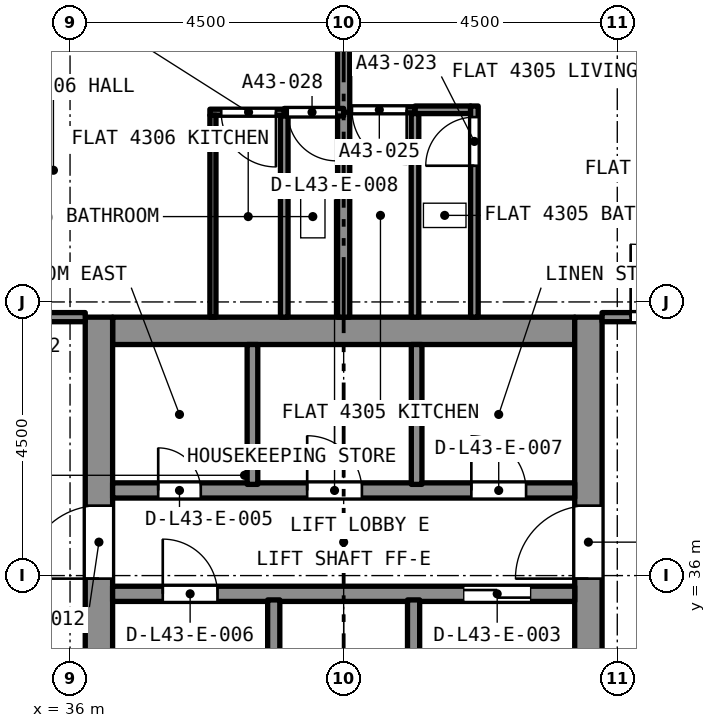
"""IFC4 building model, lengths in metres.
Left out: names, types, materials, properties, quantities, classifications, styles, units other than length and angle.
Written with IfcOpenShell. Run it as: python <this file> out.ifc"""

import sys

from ifc_helpers import new_model, si_unit, direction, frame, frame_2d, origin, place, context, subcontext, project, spatial, rectangle, extrude, element, fill, save


model = new_model("IFC4")
c1 = context("Model", 3, precision=1e-05, world=origin(), true_north=direction((0.0, 1.0)))
c2 = subcontext(c1, "Body", "Model", "MODEL_VIEW")
j1 = project(units=[si_unit("LENGTHUNIT", "METRE"), si_unit("PLANEANGLEUNIT", "RADIAN")], contexts=[c1])
p1 = place(None, origin())
s1 = spatial("IfcSite", under=j1, at=p1, CompositionType="ELEMENT")
p2 = place(p1, origin())
s2 = spatial("IfcBuilding", under=s1, at=p2, CompositionType="ELEMENT")
p3 = place(p2, frame((0.0, 0.0, 155.0)))
s3 = spatial("IfcBuildingStorey", under=s2, at=p3, CompositionType="ELEMENT", Elevation=155.0)
p4 = place(p3, frame((36.7, 40.025, 0.0), z_axis=(0.0, 0.0, 1.0), x_axis=(1.0, 0.0, 0.0)))
e1 = element("IfcWall", 1, at=p4, inside=s3, PredefinedType="SOLIDWALL", context=c2, shape_type="SweptSolid", body=[
    extrude(rectangle(XDim=7.6, YDim=0.45, at=frame_2d((3.8, 0.0))), origin(), (0.0, 0.0, 1.0), 4.4),
])
p5 = place(p3, frame((36.475, 27.25, 0.0), z_axis=(0.0, 0.0, 1.0), x_axis=(0.0, 1.0, 0.0)))
e2 = element("IfcWall", 2, at=p5, inside=s3, PredefinedType="SOLIDWALL", context=c2, shape_type="SweptSolid", body=[
    extrude(rectangle(XDim=13.0, YDim=0.45, at=frame_2d((6.5, 0.0))), origin(), (0.0, 0.0, 1.0), 4.4),
])
p6 = place(p5, frame((8.7, 0.0, 0.0)))
e3 = element("IfcOpeningElement", 3, at=p6, cuts=e2, PredefinedType="OPENING", context=c2, shape_type="SweptSolid", body=[
    extrude(rectangle(XDim=1.2, YDim=2.1, at=frame_2d((0.6, 1.05))), frame((0.0, 0.235, 0.0), z_axis=(0.0, -1.0, 0.0), x_axis=(1.0, 0.0, 0.0)), (0.0, 0.0, 1.0), 0.47),
])
p7 = place(p3, frame((44.525, 27.25, 0.0), z_axis=(0.0, 0.0, 1.0), x_axis=(0.0, 1.0, 0.0)))
e4 = element("IfcWall", 4, at=p7, inside=s3, PredefinedType="SOLIDWALL", context=c2, shape_type="SweptSolid", body=[
    extrude(rectangle(XDim=13.0, YDim=0.45, at=frame_2d((6.5, 0.0))), origin(), (0.0, 0.0, 1.0), 4.4),
])
p8 = place(p7, frame((8.7, 0.0, 0.0)))
e5 = element("IfcOpeningElement", 5, at=p8, cuts=e4, PredefinedType="OPENING", context=c2, shape_type="SweptSolid", body=[
    extrude(rectangle(XDim=1.2, YDim=2.1, at=frame_2d((0.6, 1.05))), frame((0.0, 0.235, 0.0), z_axis=(0.0, -1.0, 0.0), x_axis=(1.0, 0.0, 0.0)), (0.0, 0.0, 1.0), 0.47),
])
p9 = place(p3, frame((41.673, 43.66, 0.0), z_axis=(0.0, 0.0, 1.0), x_axis=(1.0, 0.0, 0.0)))
e6 = element("IfcWall", 6, at=p9, inside=s3, PredefinedType="PARTITIONING", context=c2, shape_type="SweptSolid", body=[
    extrude(rectangle(XDim=0.915, YDim=0.125, at=frame_2d((0.458, 0.0))), origin(), (0.0, 0.0, 1.0), 4.1),
])
p10 = place(p3, frame((42.65, 40.25, 0.0), z_axis=(0.0, 0.0, 1.0), x_axis=(0.0, 1.0, 0.0)))
e7 = element("IfcWall", 7, at=p10, inside=s3, PredefinedType="PARTITIONING", context=c2, shape_type="SweptSolid", body=[
    extrude(rectangle(XDim=3.472, YDim=0.125, at=frame_2d((1.736, 0.0))), origin(), (0.0, 0.0, 1.0), 4.1),
])
p11 = place(p10, frame((2.49, 0.0, 0.0)))
e8 = element("IfcOpeningElement", 8, at=p11, cuts=e7, PredefinedType="OPENING", context=c2, shape_type="SweptSolid", body=[
    extrude(rectangle(XDim=0.8, YDim=2.1, at=frame_2d((0.4, 1.05))), frame((0.0, 0.073, 0.0), z_axis=(0.0, -1.0, 0.0), x_axis=(1.0, 0.0, 0.0)), (0.0, 0.0, 1.0), 0.145),
])
p12 = place(p3, frame((41.673, 40.25, 0.0), z_axis=(0.0, 0.0, 1.0), x_axis=(0.0, 1.0, 0.0)))
e9 = element("IfcWall", 9, at=p12, inside=s3, PredefinedType="PARTITIONING", context=c2, shape_type="SweptSolid", body=[
    extrude(rectangle(XDim=3.347, YDim=0.125, at=frame_2d((1.674, 0.0))), origin(), (0.0, 0.0, 1.0), 4.1),
])
p13 = place(p3, frame((41.673, 43.66, 0.0), z_axis=(0.0, 0.0, 1.0), x_axis=(-1.0, 0.0, 0.0)))
e10 = element("IfcWall", 10, at=p13, inside=s3, PredefinedType="PARTITIONING", context=c2, shape_type="SweptSolid", body=[
    extrude(rectangle(XDim=1.073, YDim=0.1, at=frame_2d((0.536, 0.0))), origin(), (0.0, 0.0, 1.0), 4.1),
])
p14 = place(p13, frame((0.136, 0.0, 0.0)))
e11 = element("IfcOpeningElement", 11, at=p14, cuts=e10, PredefinedType="OPENING", context=c2, shape_type="SweptSolid", body=[
    extrude(rectangle(XDim=0.9, YDim=2.1, at=frame_2d((0.45, 1.05))), frame((0.0, 0.06, 0.0), z_axis=(0.0, -1.0, 0.0), x_axis=(1.0, 0.0, 0.0)), (0.0, 0.0, 1.0), 0.12),
])
p15 = place(p3, frame((40.5, 43.61, 0.0), z_axis=(0.0, 0.0, 1.0), x_axis=(0.0, 1.0, 0.0)))
e12 = element("IfcWall", 12, at=p15, inside=s3, PredefinedType="PARTITIONING", context=c2, shape_type="SweptSolid", body=[
    extrude(rectangle(XDim=5.415, YDim=0.2, at=frame_2d((2.708, 0.0))), origin(), (0.0, 0.0, 1.0), 4.1),
])
p16 = place(p3, frame((44.75, 40.25, 0.0), z_axis=(0.0, 0.0, 1.0), x_axis=(1.0, 0.0, 0.0)))
e13 = element("IfcWall", 13, at=p16, inside=s3, PredefinedType="PARTITIONING", context=c2, shape_type="SweptSolid", body=[
    extrude(rectangle(XDim=1.8, YDim=0.15, at=frame_2d((0.9, 0.0))), origin(), (0.0, 0.0, 1.0), 4.1),
])
p17 = place(p16, frame((0.47, 0.0, 0.0)))
e14 = element("IfcOpeningElement", 14, at=p17, cuts=e13, PredefinedType="OPENING", context=c2, shape_type="SweptSolid", body=[
    extrude(rectangle(XDim=1.2, YDim=2.4, at=frame_2d((0.6, 1.2))), frame((0.0, 0.085, 0.0), z_axis=(0.0, -1.0, 0.0), x_axis=(1.0, 0.0, 0.0)), (0.0, 0.0, 1.0), 0.17),
])
p18 = place(p3, frame((40.5, 40.25, 0.0), z_axis=(0.0, 0.0, 1.0), x_axis=(0.0, 1.0, 0.0)))
e15 = element("IfcWall", 15, at=p18, inside=s3, PredefinedType="PARTITIONING", context=c2, shape_type="SweptSolid", body=[
    extrude(rectangle(XDim=3.37, YDim=0.2, at=frame_2d((1.685, 0.0))), origin(), (0.0, 0.0, 1.0), 4.1),
])
p19 = place(p3, frame((40.5, 43.62, 0.0), z_axis=(0.0, 0.0, 1.0), x_axis=(-1.0, 0.0, 0.0)))
e16 = element("IfcWall", 16, at=p19, inside=s3, PredefinedType="PARTITIONING", context=c2, shape_type="SweptSolid", body=[
    extrude(rectangle(XDim=0.977, YDim=0.125, at=frame_2d((0.489, 0.0))), origin(), (0.0, 0.0, 1.0), 4.1),
])
p20 = place(p19, frame((0.12, 0.0, 0.0)))
e17 = element("IfcOpeningElement", 17, at=p20, cuts=e16, PredefinedType="OPENING", context=c2, shape_type="SweptSolid", body=[
    extrude(rectangle(XDim=0.8, YDim=2.1, at=frame_2d((0.4, 1.05))), frame((0.0, 0.073, 0.0), z_axis=(0.0, -1.0, 0.0), x_axis=(1.0, 0.0, 0.0)), (0.0, 0.0, 1.0), 0.145),
])
p21 = place(p3, frame((39.523, 40.25, 0.0), z_axis=(0.0, 0.0, 1.0), x_axis=(0.0, 1.0, 0.0)))
e18 = element("IfcWall", 18, at=p21, inside=s3, PredefinedType="PARTITIONING", context=c2, shape_type="SweptSolid", body=[
    extrude(rectangle(XDim=3.308, YDim=0.125, at=frame_2d((1.654, 0.0))), origin(), (0.0, 0.0, 1.0), 4.1),
])
p22 = place(p3, frame((39.523, 43.62, 0.0), z_axis=(0.0, 0.0, 1.0), x_axis=(-1.0, 0.0, 0.0)))
e19 = element("IfcWall", 19, at=p22, inside=s3, PredefinedType="PARTITIONING", context=c2, shape_type="SweptSolid", body=[
    extrude(rectangle(XDim=1.223, YDim=0.1, at=frame_2d((0.611, 0.0))), origin(), (0.0, 0.0, 1.0), 4.1),
])
p23 = place(p22, frame((0.136, 0.0, 0.0)))
e20 = element("IfcOpeningElement", 20, at=p23, cuts=e19, PredefinedType="OPENING", context=c2, shape_type="SweptSolid", body=[
    extrude(rectangle(XDim=0.9, YDim=2.1, at=frame_2d((0.45, 1.05))), frame((0.0, 0.06, 0.0), z_axis=(0.0, -1.0, 0.0), x_axis=(1.0, 0.0, 0.0)), (0.0, 0.0, 1.0), 0.12),
])
p24 = place(p3, frame((38.35, 40.25, 0.0), z_axis=(0.0, 0.0, 1.0), x_axis=(0.0, 1.0, 0.0)))
e21 = element("IfcWall", 21, at=p24, inside=s3, PredefinedType="PARTITIONING", context=c2, shape_type="SweptSolid", body=[
    extrude(rectangle(XDim=3.32, YDim=0.1, at=frame_2d((1.66, 0.0))), origin(), (0.0, 0.0, 1.0), 4.1),
])
p25 = place(p3, frame((33.975, 40.25, 0.0), z_axis=(0.0, 0.0, 1.0), x_axis=(1.0, 0.0, 0.0)))
e22 = element("IfcWall", 22, at=p25, inside=s3, PredefinedType="PARTITIONING", context=c2, shape_type="SweptSolid", body=[
    extrude(rectangle(XDim=2.275, YDim=0.15, at=frame_2d((1.137, 0.0))), origin(), (0.0, 0.0, 1.0), 4.1),
])
p26 = place(p25, frame((0.13, 0.0, 0.0)))
e23 = element("IfcOpeningElement", 23, at=p26, cuts=e22, PredefinedType="OPENING", context=c2, shape_type="SweptSolid", body=[
    extrude(rectangle(XDim=1.2, YDim=2.4, at=frame_2d((0.6, 1.2))), frame((0.0, 0.085, 0.0), z_axis=(0.0, -1.0, 0.0), x_axis=(1.0, 0.0, 0.0)), (0.0, 0.0, 1.0), 0.17),
])
p27 = place(p3, frame((36.7, 35.7, 0.0), z_axis=(0.0, 0.0, 1.0), x_axis=(1.0, 0.0, 0.0)))
e24 = element("IfcWall", 24, at=p27, inside=s3, PredefinedType="SOLIDWALL", context=c2, shape_type="SweptSolid", body=[
    extrude(rectangle(XDim=7.6, YDim=0.25, at=frame_2d((3.8, 0.0))), origin(), (0.0, 0.0, 1.0), 4.1),
])
p28 = place(p27, frame((5.775, 0.0, 0.0)))
e25 = element("IfcOpeningElement", 25, at=p28, cuts=e24, PredefinedType="OPENING", context=c2, shape_type="SweptSolid", body=[
    extrude(rectangle(XDim=1.1, YDim=2.4, at=frame_2d((0.55, 1.2))), frame((0.0, 0.135, 0.0), z_axis=(0.0, -1.0, 0.0), x_axis=(1.0, 0.0, 0.0)), (0.0, 0.0, 1.0), 0.27),
])
p29 = place(p27, frame((0.825, 0.0, 0.0)))
e26 = element("IfcOpeningElement", 26, at=p29, cuts=e24, PredefinedType="OPENING", context=c2, shape_type="SweptSolid", body=[
    extrude(rectangle(XDim=0.9, YDim=2.1, at=frame_2d((0.45, 1.05))), frame((0.0, 0.135, 0.0), z_axis=(0.0, -1.0, 0.0), x_axis=(1.0, 0.0, 0.0)), (0.0, 0.0, 1.0), 0.27),
])
p30 = place(p3, frame((36.7, 37.4, 0.0), z_axis=(0.0, 0.0, 1.0), x_axis=(1.0, 0.0, 0.0)))
e27 = element("IfcWall", 27, at=p30, inside=s3, PredefinedType="SOLIDWALL", context=c2, shape_type="SweptSolid", body=[
    extrude(rectangle(XDim=7.6, YDim=0.25, at=frame_2d((3.8, 0.0))), origin(), (0.0, 0.0, 1.0), 4.1),
])
p31 = place(p30, frame((0.75, 0.0, 0.0)))
e28 = element("IfcOpeningElement", 28, at=p31, cuts=e27, PredefinedType="OPENING", context=c2, shape_type="SweptSolid", body=[
    extrude(rectangle(XDim=0.7, YDim=2.1, at=frame_2d((0.35, 1.05))), frame((0.0, 0.135, 0.0), z_axis=(0.0, -1.0, 0.0), x_axis=(1.0, 0.0, 0.0)), (0.0, 0.0, 1.0), 0.27),
])
p32 = place(p30, frame((5.9, 0.0, 0.0)))
e29 = element("IfcOpeningElement", 29, at=p32, cuts=e27, PredefinedType="OPENING", context=c2, shape_type="SweptSolid", body=[
    extrude(rectangle(XDim=0.9, YDim=2.1, at=frame_2d((0.45, 1.05))), frame((0.0, 0.135, 0.0), z_axis=(0.0, -1.0, 0.0), x_axis=(1.0, 0.0, 0.0)), (0.0, 0.0, 1.0), 0.27),
])
p33 = place(p30, frame((3.2, 0.0, 0.0)))
e30 = element("IfcOpeningElement", 30, at=p33, cuts=e27, PredefinedType="OPENING", context=c2, shape_type="SweptSolid", body=[
    extrude(rectangle(XDim=0.9, YDim=2.1, at=frame_2d((0.45, 1.05))), frame((0.0, 0.135, 0.0), z_axis=(0.0, -1.0, 0.0), x_axis=(1.0, 0.0, 0.0)), (0.0, 0.0, 1.0), 0.27),
])
for number, where, z_axis, x_axis in (
    (31, (41.65, 33.3, 0.0), (0.0, 0.0, 1.0), (0.0, 1.0, 0.0)),
    (32, (39.35, 33.3, 0.0), (0.0, 0.0, 1.0), (0.0, 1.0, 0.0)),
):
    element("IfcWall", number, at=place(p3, frame(where, z_axis=z_axis, x_axis=x_axis)), inside=s3, PredefinedType="SOLIDWALL", context=c2, shape_type="SweptSolid", body=[
        extrude(rectangle(XDim=2.3, YDim=0.2, at=frame_2d((1.15, 0.0))), origin(), (0.0, 0.0, 1.0), 4.1),
    ])
for number, where, z_axis, x_axis in (
    (33, (41.7, 37.5, 0.0), (0.0, 0.0, 1.0), (0.0, 1.0, 0.0)),
    (34, (39.0, 37.5, 0.0), (0.0, 0.0, 1.0), (0.0, 1.0, 0.0)),
):
    element("IfcWall", number, at=place(p3, frame(where, z_axis=z_axis, x_axis=x_axis)), inside=s3, PredefinedType="SOLIDWALL", context=c2, shape_type="SweptSolid", body=[
        extrude(rectangle(XDim=2.3, YDim=0.175, at=frame_2d((1.15, 0.0))), origin(), (0.0, 0.0, 1.0), 4.1),
    ])
p34 = place(p11, origin())
e35 = element("IfcDoor", 35, at=p34, inside=s3, OperationType="SINGLE_SWING_RIGHT", PredefinedType="DOOR", context=c2, shape_type="SweptSolid", body=[
    extrude(rectangle(XDim=0.8, YDim=2.1, at=frame_2d((0.4, 1.05))), frame((0.0, 0.025, 0.0), z_axis=(0.0, -1.0, 0.0), x_axis=(1.0, 0.0, 0.0)), (0.0, 0.0, 1.0), 0.05),
])
fill(e8, e35)
p35 = place(p14, origin())
e36 = element("IfcDoor", 36, at=p35, inside=s3, OperationType="SINGLE_SWING_RIGHT", PredefinedType="DOOR", context=c2, shape_type="SweptSolid", body=[
    extrude(rectangle(XDim=0.9, YDim=2.1, at=frame_2d((0.45, 1.05))), frame((0.0, 0.025, 0.0), z_axis=(0.0, -1.0, 0.0), x_axis=(1.0, 0.0, 0.0)), (0.0, 0.0, 1.0), 0.05),
])
fill(e11, e36)
p36 = place(p17, origin())
e37 = element("IfcDoor", 37, at=p36, inside=s3, OperationType="SINGLE_SWING_RIGHT", PredefinedType="DOOR", context=c2, shape_type="SweptSolid", body=[
    extrude(rectangle(XDim=1.2, YDim=2.4, at=frame_2d((0.6, 1.2))), frame((0.0, 0.025, 0.0), z_axis=(0.0, -1.0, 0.0), x_axis=(1.0, 0.0, 0.0)), (0.0, 0.0, 1.0), 0.05),
])
fill(e14, e37)
p37 = place(p20, origin())
e38 = element("IfcDoor", 38, at=p37, inside=s3, OperationType="SINGLE_SWING_LEFT", PredefinedType="DOOR", context=c2, shape_type="SweptSolid", body=[
    extrude(rectangle(XDim=0.8, YDim=2.1, at=frame_2d((0.4, 1.05))), frame((0.0, 0.025, 0.0), z_axis=(0.0, -1.0, 0.0), x_axis=(1.0, 0.0, 0.0)), (0.0, 0.0, 1.0), 0.05),
])
fill(e17, e38)
p38 = place(p23, origin())
e39 = element("IfcDoor", 39, at=p38, inside=s3, OperationType="SINGLE_SWING_LEFT", PredefinedType="DOOR", context=c2, shape_type="SweptSolid", body=[
    extrude(rectangle(XDim=0.9, YDim=2.1, at=frame_2d((0.45, 1.05))), frame((0.0, 0.025, 0.0), z_axis=(0.0, -1.0, 0.0), x_axis=(1.0, 0.0, 0.0)), (0.0, 0.0, 1.0), 0.05),
])
fill(e20, e39)
p39 = place(p28, origin())
e40 = element("IfcDoor", 40, at=p39, inside=s3, OperationType="SLIDING_TO_LEFT", PredefinedType="DOOR", context=c2, shape_type="SweptSolid", body=[
    extrude(rectangle(XDim=1.1, YDim=2.4, at=frame_2d((0.55, 1.2))), frame((0.0, 0.025, 0.0), z_axis=(0.0, -1.0, 0.0), x_axis=(1.0, 0.0, 0.0)), (0.0, 0.0, 1.0), 0.05),
])
fill(e25, e40)
p40 = place(p31, origin())
e41 = element("IfcDoor", 41, at=p40, inside=s3, OperationType="SINGLE_SWING_LEFT", PredefinedType="DOOR", context=c2, shape_type="SweptSolid", body=[
    extrude(rectangle(XDim=0.7, YDim=2.1, at=frame_2d((0.35, 1.05))), frame((0.0, 0.025, 0.0), z_axis=(0.0, -1.0, 0.0), x_axis=(1.0, 0.0, 0.0)), (0.0, 0.0, 1.0), 0.05),
])
fill(e28, e41)
p41 = place(p29, origin())
e42 = element("IfcDoor", 42, at=p41, inside=s3, OperationType="SINGLE_SWING_LEFT", PredefinedType="DOOR", context=c2, shape_type="SweptSolid", body=[
    extrude(rectangle(XDim=0.9, YDim=2.1, at=frame_2d((0.45, 1.05))), frame((0.0, 0.025, 0.0), z_axis=(0.0, -1.0, 0.0), x_axis=(1.0, 0.0, 0.0)), (0.0, 0.0, 1.0), 0.05),
])
fill(e26, e42)
p42 = place(p32, origin())
e43 = element("IfcDoor", 43, at=p42, inside=s3, OperationType="SINGLE_SWING_LEFT", PredefinedType="DOOR", context=c2, shape_type="SweptSolid", body=[
    extrude(rectangle(XDim=0.9, YDim=2.1, at=frame_2d((0.45, 1.05))), frame((0.0, 0.025, 0.0), z_axis=(0.0, -1.0, 0.0), x_axis=(1.0, 0.0, 0.0)), (0.0, 0.0, 1.0), 0.05),
])
fill(e29, e43)
p43 = place(p33, origin())
e44 = element("IfcDoor", 44, at=p43, inside=s3, OperationType="SINGLE_SWING_LEFT", PredefinedType="DOOR", context=c2, shape_type="SweptSolid", body=[
    extrude(rectangle(XDim=0.9, YDim=2.1, at=frame_2d((0.45, 1.05))), frame((0.0, 0.025, 0.0), z_axis=(0.0, -1.0, 0.0), x_axis=(1.0, 0.0, 0.0)), (0.0, 0.0, 1.0), 0.05),
])
fill(e30, e44)
p44 = place(p6, origin())
e45 = element("IfcDoor", 45, at=p44, inside=s3, OperationType="SINGLE_SWING_LEFT", PredefinedType="DOOR", context=c2, shape_type="SweptSolid", body=[
    extrude(rectangle(XDim=1.2, YDim=2.1, at=frame_2d((0.6, 1.05))), frame((0.0, 0.025, 0.0), z_axis=(0.0, -1.0, 0.0), x_axis=(1.0, 0.0, 0.0)), (0.0, 0.0, 1.0), 0.05),
])
fill(e3, e45)
p45 = place(p8, origin())
e46 = element("IfcDoor", 46, at=p45, inside=s3, OperationType="SINGLE_SWING_LEFT", PredefinedType="DOOR", context=c2, shape_type="SweptSolid", body=[
    extrude(rectangle(XDim=1.2, YDim=2.1, at=frame_2d((0.6, 1.05))), frame((0.0, 0.025, 0.0), z_axis=(0.0, -1.0, 0.0), x_axis=(1.0, 0.0, 0.0)), (0.0, 0.0, 1.0), 0.05),
])
fill(e5, e46)
save(model, sys.argv[1])
